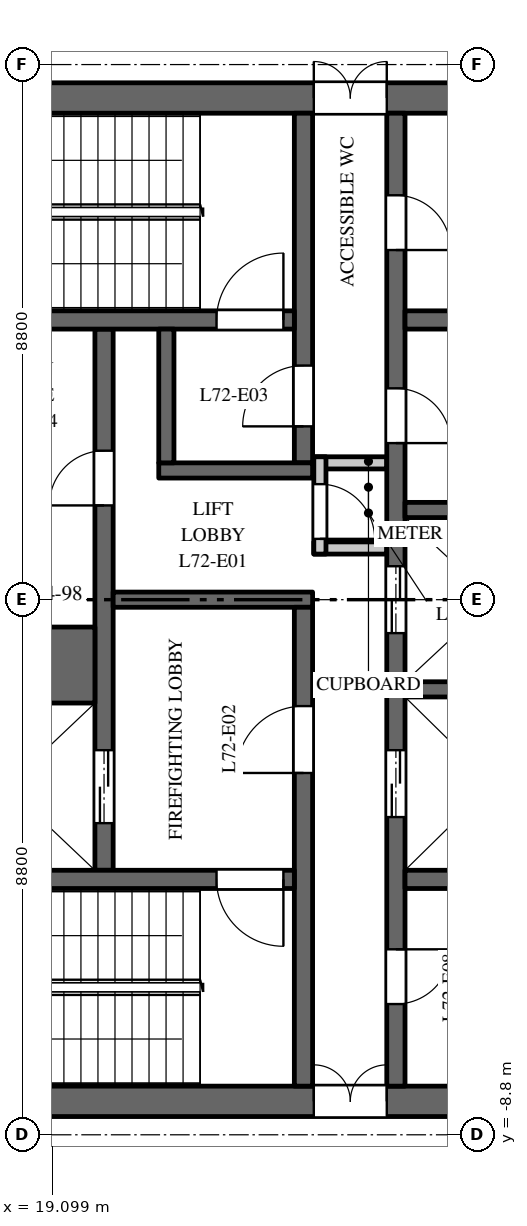
"""IFC4 building model, lengths in metres.
Left out: names, types, materials, properties, quantities, classifications, styles, units other than length and angle.
Written with IfcOpenShell. Run it as: python <this file> out.ifc"""

import sys

from ifc_helpers import new_model, si_unit, direction, frame, frame_2d, origin, place, context, subcontext, project, spatial, rectangle, extrude, element, fill, save


model = new_model("IFC4")
c1 = context("Model", 3, precision=1e-05, world=origin(), true_north=direction((0.0, 1.0)))
c2 = subcontext(c1, "Body", "Model", "MODEL_VIEW")
j1 = project(units=[si_unit("LENGTHUNIT", "METRE"), si_unit("PLANEANGLEUNIT", "RADIAN")], contexts=[c1])
p1 = place(None, origin())
s1 = spatial("IfcSite", under=j1, at=p1, CompositionType="ELEMENT")
p2 = place(p1, origin())
s2 = spatial("IfcBuilding", under=s1, at=p2, CompositionType="ELEMENT")
p3 = place(p2, frame((0.0, 0.0, 331.0)))
s3 = spatial("IfcBuildingStorey", under=s2, at=p3, CompositionType="ELEMENT", Elevation=331.0)
p4 = place(p3, frame((16.5, 8.25, 0.0), z_axis=(0.0, 0.0, 1.0), x_axis=(1.0, 0.0, 0.0)))
e1 = element("IfcWall", 1, at=p4, inside=s3, PredefinedType="SHEAR", context=c2, shape_type="SweptSolid", body=[
    extrude(rectangle(XDim=15.5, YDim=0.5, at=frame_2d((7.75, 0.0))), origin(), (0.0, 0.0, 1.0), 3.7),
])
p5 = place(p4, frame((6.9, 0.0, 0.0)))
e2 = element("IfcOpeningElement", 2, at=p5, cuts=e1, PredefinedType="OPENING", context=c2, shape_type="SweptSolid", body=[
    extrude(rectangle(XDim=1.2, YDim=2.1, at=frame_2d((0.6, 1.05))), frame((0.0, 0.26, 0.0), z_axis=(0.0, -1.0, 0.0), x_axis=(1.0, 0.0, 0.0)), (0.0, 0.0, 1.0), 0.52),
])
p6 = place(p4, frame((12.425, 0.0, 0.0)))
e3 = element("IfcOpeningElement", 3, at=p6, cuts=e1, PredefinedType="OPENING", context=c2, shape_type="SweptSolid", body=[
    extrude(rectangle(XDim=0.9, YDim=2.1, at=frame_2d((0.45, 1.05))), frame((0.0, 0.26, 0.0), z_axis=(0.0, -1.0, 0.0), x_axis=(1.0, 0.0, 0.0)), (0.0, 0.0, 1.0), 0.52),
])
p7 = place(p3, frame((16.5, -8.25, 0.0), z_axis=(0.0, 0.0, 1.0), x_axis=(1.0, 0.0, 0.0)))
e4 = element("IfcWall", 4, at=p7, inside=s3, PredefinedType="SHEAR", context=c2, shape_type="SweptSolid", body=[
    extrude(rectangle(XDim=15.5, YDim=0.5, at=frame_2d((7.75, 0.0))), origin(), (0.0, 0.0, 1.0), 3.7),
])
p8 = place(p7, frame((6.9, 0.0, 0.0)))
e5 = element("IfcOpeningElement", 5, at=p8, cuts=e4, PredefinedType="OPENING", context=c2, shape_type="SweptSolid", body=[
    extrude(rectangle(XDim=1.2, YDim=2.1, at=frame_2d((0.6, 1.05))), frame((0.0, 0.26, 0.0), z_axis=(0.0, -1.0, 0.0), x_axis=(1.0, 0.0, 0.0)), (0.0, 0.0, 1.0), 0.52),
])
p9 = place(p7, frame((12.05, 0.0, 0.0)))
e6 = element("IfcOpeningElement", 6, at=p9, cuts=e4, PredefinedType="OPENING", context=c2, shape_type="SweptSolid", body=[
    extrude(rectangle(XDim=0.9, YDim=2.1, at=frame_2d((0.45, 1.05))), frame((0.0, 0.26, 0.0), z_axis=(0.0, -1.0, 0.0), x_axis=(1.0, 0.0, 0.0)), (0.0, 0.0, 1.0), 0.52),
])
p10 = place(p3, frame((19.95, -4.45, 0.0), z_axis=(0.0, 0.0, 1.0), x_axis=(0.0, 1.0, 0.0)))
e7 = element("IfcWall", 7, at=p10, inside=s3, PredefinedType="SHEAR", context=c2, shape_type="SweptSolid", body=[
    extrude(rectangle(XDim=8.9, YDim=0.3, at=frame_2d((4.45, 0.0))), origin(), (0.0, 0.0, 1.0), 3.7),
])
p11 = place(p10, frame((0.775, 0.0, 0.0)))
e8 = element("IfcOpeningElement", 8, at=p11, cuts=e7, PredefinedType="OPENING", context=c2, shape_type="SweptSolid", body=[
    extrude(rectangle(XDim=1.2, YDim=2.1, at=frame_2d((0.6, 1.05))), frame((0.0, 0.16, 0.0), z_axis=(0.0, -1.0, 0.0), x_axis=(1.0, 0.0, 0.0)), (0.0, 0.0, 1.0), 0.32),
])
p12 = place(p10, frame((6.0, 0.0, 0.0)))
e9 = element("IfcOpeningElement", 9, at=p12, cuts=e7, PredefinedType="OPENING", context=c2, shape_type="SweptSolid", body=[
    extrude(rectangle(XDim=0.9, YDim=2.1, at=frame_2d((0.45, 1.05))), frame((0.0, 0.16, 0.0), z_axis=(0.0, -1.0, 0.0), x_axis=(1.0, 0.0, 0.0)), (0.0, 0.0, 1.0), 0.32),
])
p13 = place(p3, frame((24.75, -8.0, 0.0), z_axis=(0.0, 0.0, 1.0), x_axis=(0.0, 1.0, 0.0)))
e10 = element("IfcWall", 10, at=p13, inside=s3, PredefinedType="SHEAR", context=c2, shape_type="SweptSolid", body=[
    extrude(rectangle(XDim=16.0, YDim=0.3, at=frame_2d((8.0, 0.0))), origin(), (0.0, 0.0, 1.0), 3.7),
])
p14 = place(p13, frame((4.425, 0.0, 0.0)))
e11 = element("IfcOpeningElement", 11, at=p14, cuts=e10, PredefinedType="OPENING", context=c2, shape_type="SweptSolid", body=[
    extrude(rectangle(XDim=1.1, YDim=2.1, at=frame_2d((0.55, 1.05))), frame((0.0, 0.16, 0.0), z_axis=(0.0, -1.0, 0.0), x_axis=(1.0, 0.0, 0.0)), (0.0, 0.0, 1.0), 0.32),
])
p15 = place(p13, frame((7.45, 0.0, 0.0)))
e12 = element("IfcOpeningElement", 12, at=p15, cuts=e10, PredefinedType="OPENING", context=c2, shape_type="SweptSolid", body=[
    extrude(rectangle(XDim=1.1, YDim=2.1, at=frame_2d((0.55, 1.05))), frame((0.0, 0.16, 0.0), z_axis=(0.0, -1.0, 0.0), x_axis=(1.0, 0.0, 0.0)), (0.0, 0.0, 1.0), 0.32),
])
p16 = place(p13, frame((10.575, 0.0, 0.0)))
e13 = element("IfcOpeningElement", 13, at=p16, cuts=e10, PredefinedType="OPENING", context=c2, shape_type="SweptSolid", body=[
    extrude(rectangle(XDim=0.9, YDim=2.1, at=frame_2d((0.45, 1.05))), frame((0.0, 0.16, 0.0), z_axis=(0.0, -1.0, 0.0), x_axis=(1.0, 0.0, 0.0)), (0.0, 0.0, 1.0), 0.32),
])
p17 = place(p13, frame((13.75, 0.0, 0.0)))
e14 = element("IfcOpeningElement", 14, at=p17, cuts=e10, PredefinedType="OPENING", context=c2, shape_type="SweptSolid", body=[
    extrude(rectangle(XDim=0.9, YDim=2.1, at=frame_2d((0.45, 1.05))), frame((0.0, 0.16, 0.0), z_axis=(0.0, -1.0, 0.0), x_axis=(1.0, 0.0, 0.0)), (0.0, 0.0, 1.0), 0.32),
])
p18 = place(p13, frame((1.35, 0.0, 0.0)))
e15 = element("IfcOpeningElement", 15, at=p18, cuts=e10, PredefinedType="OPENING", context=c2, shape_type="SweptSolid", body=[
    extrude(rectangle(XDim=0.9, YDim=2.1, at=frame_2d((0.45, 1.05))), frame((0.0, 0.16, 0.0), z_axis=(0.0, -1.0, 0.0), x_axis=(1.0, 0.0, 0.0)), (0.0, 0.0, 1.0), 0.32),
])
p19 = place(p3, frame((20.1, 0.0, 0.0), z_axis=(0.0, 0.0, 1.0), x_axis=(1.0, 0.0, 0.0)))
e16 = element("IfcWall", 16, at=p19, inside=s3, PredefinedType="SHEAR", context=c2, shape_type="SweptSolid", body=[
    extrude(rectangle(XDim=3.28, YDim=0.25, at=frame_2d((1.64, 0.0))), origin(), (0.0, 0.0, 1.0), 3.7),
])
for number, where, z_axis, x_axis in (
    (17, (23.4, 0.85, 0.0), (0.0, 0.0, 1.0), (1.0, 0.0, 0.0)),
    (18, (23.4, 2.25, 0.0), (0.0, 0.0, 1.0), (1.0, 0.0, 0.0)),
):
    element("IfcWall", number, at=place(p3, frame(where, z_axis=z_axis, x_axis=x_axis)), inside=s3, PredefinedType="PARTITIONING", context=c2, shape_type="SweptSolid", body=[
        extrude(rectangle(XDim=1.2, YDim=0.2, at=frame_2d((0.6, 0.0))), origin(), (0.0, 0.0, 1.0), 3.7),
    ])
p20 = place(p3, frame((23.5, 0.75, 0.0), z_axis=(0.0, 0.0, 1.0), x_axis=(0.0, 1.0, 0.0)))
e19 = element("IfcWall", 19, at=p20, inside=s3, PredefinedType="PARTITIONING", context=c2, shape_type="SweptSolid", body=[
    extrude(rectangle(XDim=1.6, YDim=0.2, at=frame_2d((0.8, 0.0))), origin(), (0.0, 0.0, 1.0), 3.7),
])
p21 = place(p20, frame((0.25, 0.0, 0.0)))
e20 = element("IfcOpeningElement", 20, at=p21, cuts=e19, PredefinedType="OPENING", context=c2, shape_type="SweptSolid", body=[
    extrude(rectangle(XDim=0.9, YDim=2.1, at=frame_2d((0.45, 1.05))), frame((0.0, 0.11, 0.0), z_axis=(0.0, -1.0, 0.0), x_axis=(1.0, 0.0, 0.0)), (0.0, 0.0, 1.0), 0.22),
])
p22 = place(p3, frame((24.9, 4.6, 0.0), z_axis=(0.0, 0.0, 1.0), x_axis=(1.0, 0.0, 0.0)))
e21 = element("IfcWall", 21, at=p22, inside=s3, PredefinedType="SHEAR", context=c2, shape_type="SweptSolid", body=[
    extrude(rectangle(XDim=6.1, YDim=0.3, at=frame_2d((3.05, 0.0))), origin(), (0.0, 0.0, 1.0), 3.7),
])
p23 = place(p3, frame((24.9, -4.6, 0.0), z_axis=(0.0, 0.0, 1.0), x_axis=(1.0, 0.0, 0.0)))
e22 = element("IfcWall", 22, at=p23, inside=s3, PredefinedType="SHEAR", context=c2, shape_type="SweptSolid", body=[
    extrude(rectangle(XDim=6.1, YDim=0.3, at=frame_2d((3.05, 0.0))), origin(), (0.0, 0.0, 1.0), 3.7),
])
p24 = place(p23, frame((4.2, 0.0, 0.0)))
e23 = element("IfcOpeningElement", 23, at=p24, cuts=e22, PredefinedType="OPENING", context=c2, shape_type="SweptSolid", body=[
    extrude(rectangle(XDim=0.9, YDim=2.1, at=frame_2d((0.45, 1.05))), frame((0.0, 0.16, 0.0), z_axis=(0.0, -1.0, 0.0), x_axis=(1.0, 0.0, 0.0)), (0.0, 0.0, 1.0), 0.32),
])
p25 = place(p3, frame((16.9, -1.075, 0.0), z_axis=(0.0, 0.0, 1.0), x_axis=(1.0, 0.0, 0.0)))
e24 = element("IfcWall", 24, at=p25, inside=s3, PredefinedType="SHEAR", context=c2, shape_type="SweptSolid", body=[
    extrude(rectangle(XDim=2.9, YDim=1.25, at=frame_2d((1.45, 0.0))), origin(), (0.0, 0.0, 1.0), 3.7),
])
for number, where, z_axis, x_axis in (
    (25, (24.9, -1.475, 0.0), (0.0, 0.0, 1.0), (1.0, 0.0, 0.0)),
    (26, (24.9, 1.475, 0.0), (0.0, 0.0, 1.0), (1.0, 0.0, 0.0)),
):
    element("IfcWall", number, at=place(p3, frame(where, z_axis=z_axis, x_axis=x_axis)), inside=s3, PredefinedType="SHEAR", context=c2, shape_type="SweptSolid", body=[
        extrude(rectangle(XDim=2.9, YDim=0.25, at=frame_2d((1.45, 0.0))), origin(), (0.0, 0.0, 1.0), 3.7),
    ])
p26 = place(p3, frame((23.23, 2.25, 0.0), z_axis=(0.0, 0.0, 1.0), x_axis=(0.0, 1.0, 0.0)))
e27 = element("IfcWall", 27, at=p26, inside=s3, PredefinedType="SHEAR", context=c2, shape_type="SweptSolid", body=[
    extrude(rectangle(XDim=5.75, YDim=0.3, at=frame_2d((2.875, 0.0))), origin(), (0.0, 0.0, 1.0), 3.7),
])
p27 = place(p26, frame((0.6, 0.0, 0.0)))
e28 = element("IfcOpeningElement", 28, at=p27, cuts=e27, PredefinedType="OPENING", context=c2, shape_type="SweptSolid", body=[
    extrude(rectangle(XDim=1.0, YDim=2.1, at=frame_2d((0.5, 1.05))), frame((0.0, 0.16, 0.0), z_axis=(0.0, -1.0, 0.0), x_axis=(1.0, 0.0, 0.0)), (0.0, 0.0, 1.0), 0.32),
])
p28 = place(p3, frame((23.23, -8.0, 0.0), z_axis=(0.0, 0.0, 1.0), x_axis=(0.0, 1.0, 0.0)))
e29 = element("IfcWall", 29, at=p28, inside=s3, PredefinedType="SHEAR", context=c2, shape_type="SweptSolid", body=[
    extrude(rectangle(XDim=7.875, YDim=0.3, at=frame_2d((3.938, 0.0))), origin(), (0.0, 0.0, 1.0), 3.7),
])
p29 = place(p28, frame((5.15, 0.0, 0.0)))
e30 = element("IfcOpeningElement", 30, at=p29, cuts=e29, PredefinedType="OPENING", context=c2, shape_type="SweptSolid", body=[
    extrude(rectangle(XDim=1.1, YDim=2.1, at=frame_2d((0.55, 1.05))), frame((0.0, 0.16, 0.0), z_axis=(0.0, -1.0, 0.0), x_axis=(1.0, 0.0, 0.0)), (0.0, 0.0, 1.0), 0.32),
])
p30 = place(p3, frame((16.9, 4.6, 0.0), z_axis=(0.0, 0.0, 1.0), x_axis=(1.0, 0.0, 0.0)))
e31 = element("IfcWall", 31, at=p30, inside=s3, PredefinedType="SHEAR", context=c2, shape_type="SweptSolid", body=[
    extrude(rectangle(XDim=6.18, YDim=0.3, at=frame_2d((3.09, 0.0))), origin(), (0.0, 0.0, 1.0), 3.7),
])
p31 = place(p30, frame((4.9, 0.0, 0.0)))
e32 = element("IfcOpeningElement", 32, at=p31, cuts=e31, PredefinedType="OPENING", context=c2, shape_type="SweptSolid", body=[
    extrude(rectangle(XDim=1.1, YDim=2.1, at=frame_2d((0.55, 1.05))), frame((0.0, 0.16, 0.0), z_axis=(0.0, -1.0, 0.0), x_axis=(1.0, 0.0, 0.0)), (0.0, 0.0, 1.0), 0.32),
])
p32 = place(p3, frame((16.9, -4.6, 0.0), z_axis=(0.0, 0.0, 1.0), x_axis=(1.0, 0.0, 0.0)))
e33 = element("IfcWall", 33, at=p32, inside=s3, PredefinedType="SHEAR", context=c2, shape_type="SweptSolid", body=[
    extrude(rectangle(XDim=6.18, YDim=0.3, at=frame_2d((3.09, 0.0))), origin(), (0.0, 0.0, 1.0), 3.7),
])
p33 = place(p32, frame((4.9, 0.0, 0.0)))
e34 = element("IfcOpeningElement", 34, at=p33, cuts=e33, PredefinedType="OPENING", context=c2, shape_type="SweptSolid", body=[
    extrude(rectangle(XDim=1.1, YDim=2.1, at=frame_2d((0.55, 1.05))), frame((0.0, 0.16, 0.0), z_axis=(0.0, -1.0, 0.0), x_axis=(1.0, 0.0, 0.0)), (0.0, 0.0, 1.0), 0.32),
])
p34 = place(p3, frame((20.85, 2.125, 0.0), z_axis=(0.0, 0.0, 1.0), x_axis=(1.0, 0.0, 0.0)))
e35 = element("IfcWall", 35, at=p34, inside=s3, PredefinedType="SHEAR", context=c2, shape_type="SweptSolid", body=[
    extrude(rectangle(XDim=2.53, YDim=0.25, at=frame_2d((1.265, 0.0))), origin(), (0.0, 0.0, 1.0), 3.7),
])
p35 = place(p3, frame((20.975, 2.25, 0.0), z_axis=(0.0, 0.0, 1.0), x_axis=(0.0, 1.0, 0.0)))
e36 = element("IfcWall", 36, at=p35, inside=s3, PredefinedType="SHEAR", context=c2, shape_type="SweptSolid", body=[
    extrude(rectangle(XDim=2.2, YDim=0.25, at=frame_2d((1.1, 0.0))), origin(), (0.0, 0.0, 1.0), 3.7),
])
p36 = place(p11, origin())
e37 = element("IfcDoor", 37, at=p36, inside=s3, OperationType="DOUBLE_DOOR_SLIDING", PredefinedType="DOOR", context=c2, shape_type="SweptSolid", body=[
    extrude(rectangle(XDim=1.2, YDim=2.1, at=frame_2d((0.6, 1.05))), frame((0.0, 0.025, 0.0), z_axis=(0.0, -1.0, 0.0), x_axis=(1.0, 0.0, 0.0)), (0.0, 0.0, 1.0), 0.05),
])
fill(e8, e37)
p37 = place(p14, origin())
e38 = element("IfcDoor", 38, at=p37, inside=s3, OperationType="DOUBLE_DOOR_SLIDING", PredefinedType="DOOR", context=c2, shape_type="SweptSolid", body=[
    extrude(rectangle(XDim=1.1, YDim=2.1, at=frame_2d((0.55, 1.05))), frame((0.0, 0.025, 0.0), z_axis=(0.0, -1.0, 0.0), x_axis=(1.0, 0.0, 0.0)), (0.0, 0.0, 1.0), 0.05),
])
fill(e11, e38)
p38 = place(p15, origin())
e39 = element("IfcDoor", 39, at=p38, inside=s3, OperationType="DOUBLE_DOOR_SLIDING", PredefinedType="DOOR", context=c2, shape_type="SweptSolid", body=[
    extrude(rectangle(XDim=1.1, YDim=2.1, at=frame_2d((0.55, 1.05))), frame((0.0, 0.025, 0.0), z_axis=(0.0, -1.0, 0.0), x_axis=(1.0, 0.0, 0.0)), (0.0, 0.0, 1.0), 0.05),
])
fill(e12, e39)
p39 = place(p31, origin())
e40 = element("IfcDoor", 40, at=p39, inside=s3, OperationType="SINGLE_SWING_LEFT", PredefinedType="DOOR", context=c2, shape_type="SweptSolid", body=[
    extrude(rectangle(XDim=1.1, YDim=2.1, at=frame_2d((0.55, 1.05))), frame((0.0, 0.025, 0.0), z_axis=(0.0, -1.0, 0.0), x_axis=(1.0, 0.0, 0.0)), (0.0, 0.0, 1.0), 0.05),
])
fill(e32, e40)
p40 = place(p33, origin())
e41 = element("IfcDoor", 41, at=p40, inside=s3, OperationType="SINGLE_SWING_RIGHT", PredefinedType="DOOR", context=c2, shape_type="SweptSolid", body=[
    extrude(rectangle(XDim=1.1, YDim=2.1, at=frame_2d((0.55, 1.05))), frame((0.0, 0.025, 0.0), z_axis=(0.0, -1.0, 0.0), x_axis=(1.0, 0.0, 0.0)), (0.0, 0.0, 1.0), 0.05),
])
fill(e34, e41)
p41 = place(p29, origin())
e42 = element("IfcDoor", 42, at=p41, inside=s3, OperationType="SINGLE_SWING_RIGHT", PredefinedType="DOOR", context=c2, shape_type="SweptSolid", body=[
    extrude(rectangle(XDim=1.1, YDim=2.1, at=frame_2d((0.55, 1.05))), frame((0.0, 0.025, 0.0), z_axis=(0.0, -1.0, 0.0), x_axis=(1.0, 0.0, 0.0)), (0.0, 0.0, 1.0), 0.05),
])
fill(e30, e42)
p42 = place(p27, origin())
e43 = element("IfcDoor", 43, at=p42, inside=s3, OperationType="SINGLE_SWING_RIGHT", PredefinedType="DOOR", context=c2, shape_type="SweptSolid", body=[
    extrude(rectangle(XDim=1.0, YDim=2.1, at=frame_2d((0.5, 1.05))), frame((0.0, 0.025, 0.0), z_axis=(0.0, -1.0, 0.0), x_axis=(1.0, 0.0, 0.0)), (0.0, 0.0, 1.0), 0.05),
])
fill(e28, e43)
p43 = place(p5, origin())
e44 = element("IfcDoor", 44, at=p43, inside=s3, OperationType="DOUBLE_DOOR_DOUBLE_SWING", PredefinedType="DOOR", context=c2, shape_type="SweptSolid", body=[
    extrude(rectangle(XDim=1.2, YDim=2.1, at=frame_2d((0.6, 1.05))), frame((0.0, 0.025, 0.0), z_axis=(0.0, -1.0, 0.0), x_axis=(1.0, 0.0, 0.0)), (0.0, 0.0, 1.0), 0.05),
])
fill(e2, e44)
p44 = place(p8, origin())
e45 = element("IfcDoor", 45, at=p44, inside=s3, OperationType="DOUBLE_DOOR_DOUBLE_SWING", PredefinedType="DOOR", context=c2, shape_type="SweptSolid", body=[
    extrude(rectangle(XDim=1.2, YDim=2.1, at=frame_2d((0.6, 1.05))), frame((0.0, 0.025, 0.0), z_axis=(0.0, -1.0, 0.0), x_axis=(1.0, 0.0, 0.0)), (0.0, 0.0, 1.0), 0.05),
])
fill(e5, e45)
p45 = place(p12, origin())
e46 = element("IfcDoor", 46, at=p45, inside=s3, OperationType="SINGLE_SWING_RIGHT", PredefinedType="DOOR", context=c2, shape_type="SweptSolid", body=[
    extrude(rectangle(XDim=0.9, YDim=2.1, at=frame_2d((0.45, 1.05))), frame((0.0, 0.025, 0.0), z_axis=(0.0, -1.0, 0.0), x_axis=(1.0, 0.0, 0.0)), (0.0, 0.0, 1.0), 0.05),
])
fill(e9, e46)
p46 = place(p16, origin())
e47 = element("IfcDoor", 47, at=p46, inside=s3, OperationType="SINGLE_SWING_LEFT", PredefinedType="DOOR", context=c2, shape_type="SweptSolid", body=[
    extrude(rectangle(XDim=0.9, YDim=2.1, at=frame_2d((0.45, 1.05))), frame((0.0, 0.025, 0.0), z_axis=(0.0, -1.0, 0.0), x_axis=(1.0, 0.0, 0.0)), (0.0, 0.0, 1.0), 0.05),
])
fill(e13, e47)
p47 = place(p17, origin())
e48 = element("IfcDoor", 48, at=p47, inside=s3, OperationType="SINGLE_SWING_LEFT", PredefinedType="DOOR", context=c2, shape_type="SweptSolid", body=[
    extrude(rectangle(XDim=0.9, YDim=2.1, at=frame_2d((0.45, 1.05))), frame((0.0, 0.025, 0.0), z_axis=(0.0, -1.0, 0.0), x_axis=(1.0, 0.0, 0.0)), (0.0, 0.0, 1.0), 0.05),
])
fill(e14, e48)
p48 = place(p18, origin())
e49 = element("IfcDoor", 49, at=p48, inside=s3, OperationType="SINGLE_SWING_RIGHT", PredefinedType="DOOR", context=c2, shape_type="SweptSolid", body=[
    extrude(rectangle(XDim=0.9, YDim=2.1, at=frame_2d((0.45, 1.05))), frame((0.0, 0.025, 0.0), z_axis=(0.0, -1.0, 0.0), x_axis=(1.0, 0.0, 0.0)), (0.0, 0.0, 1.0), 0.05),
])
fill(e15, e49)
p49 = place(p21, origin())
e50 = element("IfcDoor", 50, at=p49, inside=s3, OperationType="SINGLE_SWING_LEFT", PredefinedType="DOOR", context=c2, shape_type="SweptSolid", body=[
    extrude(rectangle(XDim=0.9, YDim=2.1, at=frame_2d((0.45, 1.05))), frame((0.0, 0.025, 0.0), z_axis=(0.0, -1.0, 0.0), x_axis=(1.0, 0.0, 0.0)), (0.0, 0.0, 1.0), 0.05),
])
fill(e20, e50)
save(model, sys.argv[1])
